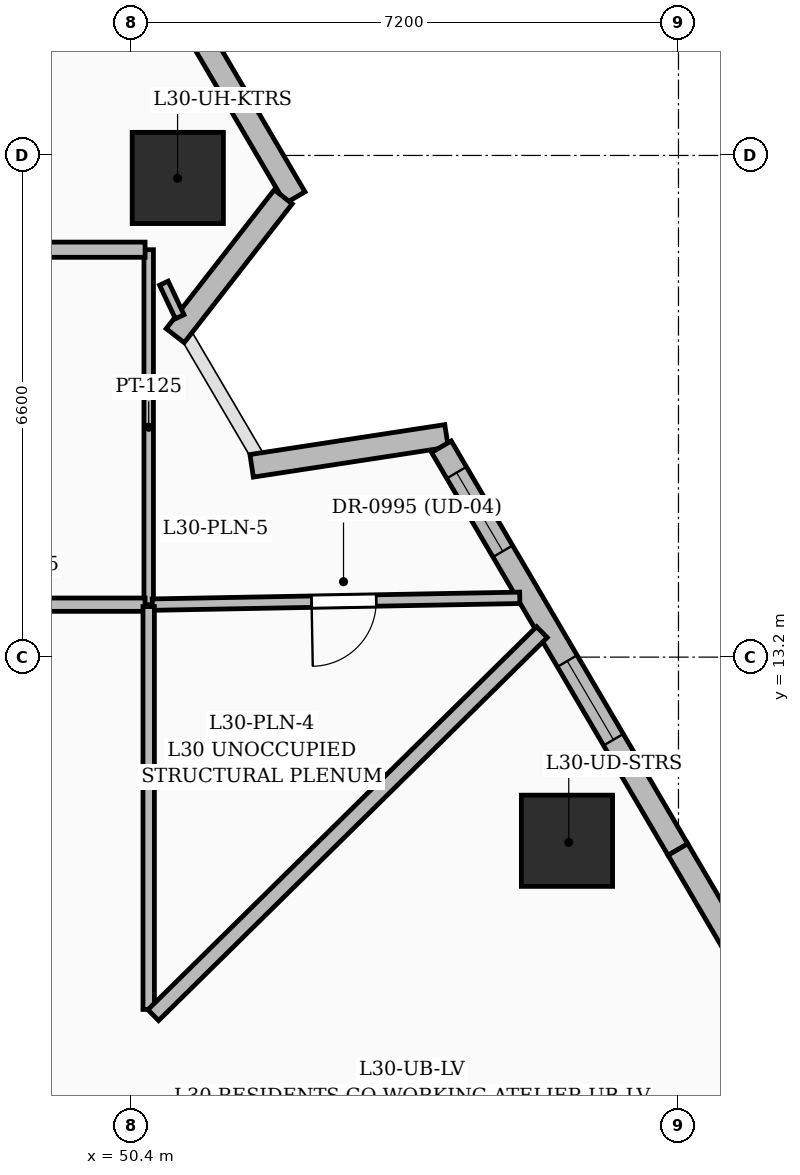
"""IFC4 building model, lengths in metres.
Left out: names, types, materials, properties, quantities, classifications, styles, units other than length and angle.
Written with IfcOpenShell. Run it as: python <this file> out.ifc"""

import sys

from ifc_helpers import new_model, si_unit, direction, frame, frame_2d, origin, origin_2d, place, context, subcontext, project, spatial, rectangle, extrude, element, fill, save


model = new_model("IFC4")
c1 = context("Model", 3, precision=1e-05, world=origin(), true_north=direction((0.0, 1.0)))
c2 = subcontext(c1, "Body", "Model", "MODEL_VIEW")
j1 = project(units=[si_unit("LENGTHUNIT", "METRE"), si_unit("PLANEANGLEUNIT", "RADIAN")], contexts=[c1])
p1 = place(None, origin())
s1 = spatial("IfcSite", under=j1, at=p1, CompositionType="ELEMENT")
p2 = place(p1, origin())
s2 = spatial("IfcBuilding", under=s1, at=p2, CompositionType="ELEMENT")
p3 = place(p2, frame((0.0, 0.0, 121.2)))
s3 = spatial("IfcBuildingStorey", under=s2, at=p3, CompositionType="ELEMENT", Elevation=121.2)
for number, where, z_axis, x_axis in (
    (1, (56.133, 10.784, 0.0), (0.0, 0.0, 1.0), (1.0, 0.0, 0.0)),
    (2, (51.013, 19.504, 0.0), (0.0, 0.0, 1.0), (1.0, 0.0, 0.0)),
):
    element("IfcColumn", number, at=place(p3, frame(where, z_axis=z_axis, x_axis=x_axis)), inside=s3, PredefinedType="COLUMN", context=c2, shape_type="SweptSolid", body=[
        extrude(rectangle(XDim=1.2, YDim=1.2, at=origin_2d()), origin(), (0.0, 0.0, 1.0), 3.6),
    ])
p4 = place(p3, frame((49.206, 24.952, 0.0), z_axis=(0.0, 0.0, 1.0), x_axis=(0.506323446146, -0.862343648369, 0.0)))
e3 = element("IfcWall", 3, at=p4, inside=s3, PredefinedType="SOLIDWALL", context=c2, shape_type="SweptSolid", body=[
    extrude(rectangle(XDim=6.617, YDim=0.3, at=frame_2d((3.309, 0.0))), origin(), (0.0, 0.0, 1.0), 3.35),
])
p5 = place(p4, frame((2.675, 0.0, 0.8)))
e4 = element("IfcOpeningElement", 4, at=p5, cuts=e3, PredefinedType="OPENING", context=c2, shape_type="SweptSolid", body=[
    extrude(rectangle(XDim=1.2, YDim=1.8, at=frame_2d((0.6, 0.9))), frame((0.0, 0.16, 0.0), z_axis=(0.0, -1.0, 0.0), x_axis=(1.0, 0.0, 0.0)), (0.0, 0.0, 1.0), 0.32),
])
p6 = place(p3, frame((52.4, 19.256, 0.0), z_axis=(0.0, 0.0, 1.0), x_axis=(-0.61408669817, -0.78923857428, 0.0)))
e5 = element("IfcWall", 5, at=p6, inside=s3, PredefinedType="SOLIDWALL", context=c2, shape_type="SweptSolid", body=[
    extrude(rectangle(XDim=2.314, YDim=0.3, at=frame_2d((1.157, 0.0))), origin(), (0.0, 0.0, 1.0), 2.575),
])
p7 = place(p3, frame((51.985, 15.717, 0.0), z_axis=(0.0, 0.0, 1.0), x_axis=(0.988435812312, 0.151639852741, 0.0)))
e6 = element("IfcWall", 6, at=p7, inside=s3, PredefinedType="SOLIDWALL", context=c2, shape_type="SweptSolid", body=[
    extrude(rectangle(XDim=2.594, YDim=0.3, at=frame_2d((1.297, 0.0))), origin(), (0.0, 0.0, 1.0), 2.575),
])
p8 = place(p3, frame((54.481, 15.968, 0.0), z_axis=(0.0, 0.0, 1.0), x_axis=(0.506334171868, -0.862337350692, 0.0)))
e7 = element("IfcWall", 7, at=p8, inside=s3, PredefinedType="SOLIDWALL", context=c2, shape_type="SweptSolid", body=[
    extrude(rectangle(XDim=6.145, YDim=0.3, at=frame_2d((3.073, 0.0))), origin(), (0.0, 0.0, 1.0), 3.35),
])
p9 = place(p8, frame((3.27, 0.0, 0.8)))
e8 = element("IfcOpeningElement", 8, at=p9, cuts=e7, PredefinedType="OPENING", context=c2, shape_type="SweptSolid", body=[
    extrude(rectangle(XDim=1.2, YDim=1.8, at=frame_2d((0.6, 0.9))), frame((0.0, 0.16, 0.0), z_axis=(0.0, -1.0, 0.0), x_axis=(1.0, 0.0, 0.0)), (0.0, 0.0, 1.0), 0.32),
])
p10 = place(p8, frame((0.395, 0.0, 0.8)))
e9 = element("IfcOpeningElement", 9, at=p10, cuts=e7, PredefinedType="OPENING", context=c2, shape_type="SweptSolid", body=[
    extrude(rectangle(XDim=1.2, YDim=1.8, at=frame_2d((0.6, 0.9))), frame((0.0, 0.16, 0.0), z_axis=(0.0, -1.0, 0.0), x_axis=(1.0, 0.0, 0.0)), (0.0, 0.0, 1.0), 0.32),
])
p11 = place(p3, frame((57.593, 10.669, 0.0), z_axis=(0.0, 0.0, 1.0), x_axis=(0.50635906926, -0.862322731336, 0.0)))
e10 = element("IfcWall", 10, at=p11, inside=s3, PredefinedType="SOLIDWALL", context=c2, shape_type="SweptSolid", body=[
    extrude(rectangle(XDim=6.425, YDim=0.3, at=frame_2d((3.212, 0.0))), origin(), (0.0, 0.0, 1.0), 3.35),
])
p12 = place(p11, frame((1.85, 0.0, 0.55)))
e11 = element("IfcOpeningElement", 11, at=p12, cuts=e10, PredefinedType="OPENING", context=c2, shape_type="SweptSolid", body=[
    extrude(rectangle(XDim=1.6, YDim=2.2, at=frame_2d((0.8, 1.1))), frame((0.0, 0.16, 0.0), z_axis=(0.0, -1.0, 0.0), x_axis=(1.0, 0.0, 0.0)), (0.0, 0.0, 1.0), 0.32),
])
p13 = place(p3, frame((50.63, 13.89, 0.0), z_axis=(0.0, 0.0, 1.0), x_axis=(0.0, 1.0, 0.0)))
e12 = element("IfcWall", 12, at=p13, inside=s3, PredefinedType="PARTITIONING", context=c2, shape_type="SweptSolid", body=[
    extrude(rectangle(XDim=4.67, YDim=0.125, at=frame_2d((2.335, 0.0))), origin(), (0.0, 0.0, 1.0), 2.787),
])
p14 = place(p3, frame((47.425, 13.89, 0.0), z_axis=(0.0, 0.0, 1.0), x_axis=(1.0, 0.0, 0.0)))
e13 = element("IfcWall", 13, at=p14, inside=s3, PredefinedType="PARTITIONING", context=c2, shape_type="SweptSolid", body=[
    extrude(rectangle(XDim=3.157, YDim=0.175, at=frame_2d((1.579, 0.0))), origin(), (0.0, 0.0, 1.0), 2.787),
])
p15 = place(p3, frame((50.583, 18.56, 0.0), z_axis=(0.0, 0.0, 1.0), x_axis=(-1.0, 0.0, 0.0)))
e14 = element("IfcWall", 14, at=p15, inside=s3, PredefinedType="PARTITIONING", context=c2, shape_type="SweptSolid", body=[
    extrude(rectangle(XDim=3.663, YDim=0.2, at=frame_2d((1.831, 0.0))), origin(), (0.0, 0.0, 1.0), 2.372),
])
p16 = place(p3, frame((55.512, 13.98, 0.0), z_axis=(0.0, 0.0, 1.0), x_axis=(-0.999829233449, -0.018479825242, 0.0)))
e15 = element("IfcWall", 15, at=p16, inside=s3, PredefinedType="PARTITIONING", context=c2, shape_type="SweptSolid", body=[
    extrude(rectangle(XDim=4.835, YDim=0.15, at=frame_2d((2.417, 0.0))), origin(), (0.0, 0.0, 1.0), 2.57),
])
p17 = place(p16, frame((1.889, 0.0, 0.0)))
e16 = element("IfcOpeningElement", 16, at=p17, cuts=e15, PredefinedType="OPENING", context=c2, shape_type="SweptSolid", body=[
    extrude(rectangle(XDim=0.85, YDim=2.1, at=frame_2d((0.425, 1.05))), frame((0.0, 0.085, 0.0), z_axis=(0.0, -1.0, 0.0), x_axis=(1.0, 0.0, 0.0)), (0.0, 0.0, 1.0), 0.17),
])
p18 = place(p3, frame((50.63, 13.865, 0.0), z_axis=(0.0, 0.0, 1.0), x_axis=(0.0, -1.0, 0.0)))
e17 = element("IfcWall", 17, at=p18, inside=s3, PredefinedType="PARTITIONING", context=c2, shape_type="SweptSolid", body=[
    extrude(rectangle(XDim=5.3, YDim=0.15, at=frame_2d((2.65, 0.0))), origin(), (0.0, 0.0, 1.0), 2.372),
])
p19 = place(p3, frame((51.038, 17.678, 0.0), z_axis=(0.0, 0.0, 1.0), x_axis=(-0.425700784292, 0.904863991025, 0.0)))
e18 = element("IfcWall", 18, at=p19, inside=s3, PredefinedType="PARTITIONING", context=c2, shape_type="SweptSolid", body=[
    extrude(rectangle(XDim=0.489, YDim=0.125, at=frame_2d((0.244, 0.0))), origin(), (0.0, 0.0, 1.0), 3.35),
])
p20 = place(p3, frame((50.69, 8.49, 0.0), z_axis=(0.0, 0.0, 1.0), x_axis=(0.712240299824, 0.70193572021, 0.0)))
e19 = element("IfcWall", 19, at=p20, inside=s3, PredefinedType="PARTITIONING", context=c2, shape_type="SweptSolid", body=[
    extrude(rectangle(XDim=7.179, YDim=0.2, at=frame_2d((3.589, 0.0))), origin(), (0.0, 0.0, 1.0), 2.372),
])
p21 = place(p9, origin())
e20 = element("IfcWindow", 20, at=p21, inside=s3, PartitioningType="SINGLE_PANEL", PredefinedType="WINDOW", context=c2, shape_type="SweptSolid", body=[
    extrude(rectangle(XDim=1.2, YDim=1.8, at=frame_2d((0.6, 0.9))), frame((0.0, 0.03, 0.0), z_axis=(0.0, -1.0, 0.0), x_axis=(1.0, 0.0, 0.0)), (0.0, 0.0, 1.0), 0.06),
])
fill(e8, e20)
p22 = place(p10, origin())
e21 = element("IfcWindow", 21, at=p22, inside=s3, PartitioningType="SINGLE_PANEL", PredefinedType="WINDOW", context=c2, shape_type="SweptSolid", body=[
    extrude(rectangle(XDim=1.2, YDim=1.8, at=frame_2d((0.6, 0.9))), frame((0.0, 0.03, 0.0), z_axis=(0.0, -1.0, 0.0), x_axis=(1.0, 0.0, 0.0)), (0.0, 0.0, 1.0), 0.06),
])
fill(e9, e21)
p23 = place(p17, origin())
e22 = element("IfcDoor", 22, at=p23, inside=s3, OperationType="SINGLE_SWING_RIGHT", PredefinedType="DOOR", context=c2, shape_type="SweptSolid", body=[
    extrude(rectangle(XDim=0.85, YDim=2.1, at=frame_2d((0.425, 1.05))), frame((0.0, 0.025, 0.0), z_axis=(0.0, -1.0, 0.0), x_axis=(1.0, 0.0, 0.0)), (0.0, 0.0, 1.0), 0.05),
])
fill(e16, e22)
save(model, sys.argv[1])
